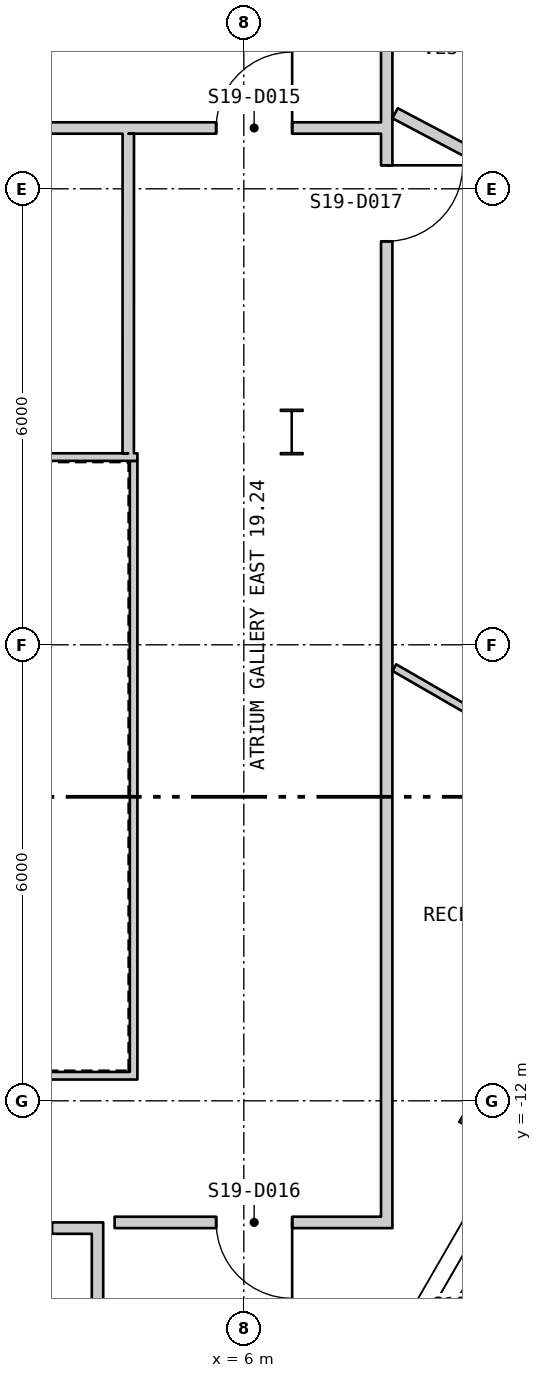
"""IFC4 building model, lengths in metres.
Left out: names, types, materials, properties, quantities, classifications, styles, units other than length and angle.
Written with IfcOpenShell. Run it as: python <this file> out.ifc"""

import sys

from ifc_helpers import new_model, si_unit, direction, frame, frame_2d, origin, origin_2d, place, context, subcontext, project, spatial, polyline, rectangle, hollow_rectangle, i_section, outline, extrude, element, fill, save


model = new_model("IFC4")
c1 = context("Model", 3, precision=1e-05, world=origin(), true_north=direction((0.0, 1.0)))
c2 = subcontext(c1, "Body", "Model", "MODEL_VIEW")
j1 = project(units=[si_unit("LENGTHUNIT", "METRE"), si_unit("PLANEANGLEUNIT", "RADIAN")], contexts=[c1])
p1 = place(None, origin())
s1 = spatial("IfcSite", under=j1, at=p1, CompositionType="ELEMENT")
p2 = place(p1, origin())
s2 = spatial("IfcBuilding", under=s1, at=p2, CompositionType="ELEMENT")
p3 = place(p2, frame((0.0, 0.0, 257.1)))
s3 = spatial("IfcBuildingStorey", under=s2, at=p3, CompositionType="ELEMENT", Elevation=257.1)
p4 = place(p3, frame((9.253, -12.238, 0.0), z_axis=(0.0, 0.0, 1.0), x_axis=(0.5, 0.866025403784, 0.0)))
e1 = element("IfcColumn", 1, at=p4, inside=s3, PredefinedType="COLUMN", context=c2, shape_type="SweptSolid", body=[
    extrude(hollow_rectangle(XDim=0.5, YDim=0.7, WallThickness=0.045, at=origin_2d()), origin(), (0.0, 0.0, 1.0), 3.9),
])
p5 = place(p3, frame((6.63, -3.2, 0.0), z_axis=(0.0, 0.0, 1.0), x_axis=(1.0, 0.0, 0.0)))
e2 = element("IfcColumn", 2, at=p5, inside=s3, PredefinedType="COLUMN", context=c2, shape_type="SweptSolid", body=[
    extrude(i_section(OverallWidth=0.3, OverallDepth=0.6, WebThickness=0.015, FlangeThickness=0.03, at=origin_2d()), origin(), (0.0, 0.0, 1.0), 3.9),
])
p6 = place(p3, frame((2.825, -24.522, -0.18), z_axis=(0.0, 0.0, 1.0), x_axis=(0.500000141277, 0.866025322218, 0.0)))
e3 = element("IfcWall", 3, at=p6, inside=s3, PredefinedType="SOLIDWALL", context=c2, shape_type="SweptSolid", body=[
    extrude(outline(polyline([(-0.13, -0.225), (45.86, -0.225), (45.6, 0.225), (0.13, 0.225), (-0.13, -0.225)])), origin(), (0.0, 0.0, 1.0), 3.68),
])
p7 = place(p6, frame((1.424, 0.0, 1.08)))
e4 = element("IfcOpeningElement", 4, at=p7, cuts=e3, PredefinedType="OPENING", context=c2, shape_type="SweptSolid", body=[
    extrude(rectangle(XDim=2.4, YDim=2.0, at=frame_2d((1.2, 1.0))), frame((0.0, 0.235, 0.0), z_axis=(0.0, -1.0, 0.0), x_axis=(1.0, 0.0, 0.0)), (0.0, 0.0, 1.0), 0.47),
])
p8 = place(p6, frame((5.892, 0.0, 1.08)))
e5 = element("IfcOpeningElement", 5, at=p8, cuts=e3, PredefinedType="OPENING", context=c2, shape_type="SweptSolid", body=[
    extrude(rectangle(XDim=2.4, YDim=2.0, at=frame_2d((1.2, 1.0))), frame((0.0, 0.235, 0.0), z_axis=(0.0, -1.0, 0.0), x_axis=(1.0, 0.0, 0.0)), (0.0, 0.0, 1.0), 0.47),
])
p9 = place(p6, frame((10.399, 0.0, 1.08)))
e6 = element("IfcOpeningElement", 6, at=p9, cuts=e3, PredefinedType="OPENING", context=c2, shape_type="SweptSolid", body=[
    extrude(rectangle(XDim=2.4, YDim=2.0, at=frame_2d((1.2, 1.0))), frame((0.0, 0.235, 0.0), z_axis=(0.0, -1.0, 0.0), x_axis=(1.0, 0.0, 0.0)), (0.0, 0.0, 1.0), 0.47),
])
p10 = place(p6, frame((14.905, 0.0, 1.08)))
e7 = element("IfcOpeningElement", 7, at=p10, cuts=e3, PredefinedType="OPENING", context=c2, shape_type="SweptSolid", body=[
    extrude(rectangle(XDim=2.4, YDim=2.0, at=frame_2d((1.2, 1.0))), frame((0.0, 0.235, 0.0), z_axis=(0.0, -1.0, 0.0), x_axis=(1.0, 0.0, 0.0)), (0.0, 0.0, 1.0), 0.47),
])
p11 = place(p6, frame((19.412, 0.0, 1.08)))
e8 = element("IfcOpeningElement", 8, at=p11, cuts=e3, PredefinedType="OPENING", context=c2, shape_type="SweptSolid", body=[
    extrude(rectangle(XDim=2.4, YDim=2.0, at=frame_2d((1.2, 1.0))), frame((0.0, 0.235, 0.0), z_axis=(0.0, -1.0, 0.0), x_axis=(1.0, 0.0, 0.0)), (0.0, 0.0, 1.0), 0.47),
])
p12 = place(p6, frame((28.425, 0.0, 1.08)))
e9 = element("IfcOpeningElement", 9, at=p12, cuts=e3, PredefinedType="OPENING", context=c2, shape_type="SweptSolid", body=[
    extrude(rectangle(XDim=2.4, YDim=2.0, at=frame_2d((1.2, 1.0))), frame((0.0, 0.235, 0.0), z_axis=(0.0, -1.0, 0.0), x_axis=(1.0, 0.0, 0.0)), (0.0, 0.0, 1.0), 0.47),
])
p13 = place(p6, frame((37.438, 0.0, 1.08)))
e10 = element("IfcOpeningElement", 10, at=p13, cuts=e3, PredefinedType="OPENING", context=c2, shape_type="SweptSolid", body=[
    extrude(rectangle(XDim=2.4, YDim=2.0, at=frame_2d((1.2, 1.0))), frame((0.0, 0.235, 0.0), z_axis=(0.0, -1.0, 0.0), x_axis=(1.0, 0.0, 0.0)), (0.0, 0.0, 1.0), 0.47),
])
p14 = place(p6, frame((41.907, 0.0, 1.08)))
e11 = element("IfcOpeningElement", 11, at=p14, cuts=e3, PredefinedType="OPENING", context=c2, shape_type="SweptSolid", body=[
    extrude(rectangle(XDim=2.4, YDim=2.0, at=frame_2d((1.2, 1.0))), frame((0.0, 0.235, 0.0), z_axis=(0.0, -1.0, 0.0), x_axis=(1.0, 0.0, 0.0)), (0.0, 0.0, 1.0), 0.47),
])
p15 = place(p3, frame((-4.6, -11.67, 0.0), z_axis=(0.0, 0.0, 1.0), x_axis=(1.0, 0.0, 0.0)))
e12 = element("IfcWall", 12, at=p15, inside=s3, PredefinedType="PARTITIONING", context=c2, shape_type="SweptSolid", body=[
    extrude(rectangle(XDim=9.2, YDim=0.1, at=frame_2d((4.6, 0.0))), origin(), (0.0, 0.0, 1.0), 3.7),
])
p16 = place(p3, frame((4.55, -11.62, 0.0), z_axis=(0.0, 0.0, 1.0), x_axis=(0.0, 1.0, 0.0)))
e13 = element("IfcWall", 13, at=p16, inside=s3, PredefinedType="PARTITIONING", context=c2, shape_type="SweptSolid", body=[
    extrude(rectangle(XDim=8.04, YDim=0.1, at=frame_2d((4.02, 0.0))), origin(), (0.0, 0.0, 1.0), 3.7),
])
p17 = place(p3, frame((4.6, -3.53, 0.0), z_axis=(0.0, 0.0, 1.0), x_axis=(-1.0, 0.0, 0.0)))
e14 = element("IfcWall", 14, at=p17, inside=s3, PredefinedType="PARTITIONING", context=c2, shape_type="SweptSolid", body=[
    extrude(rectangle(XDim=9.2, YDim=0.1, at=frame_2d((4.6, 0.0))), origin(), (0.0, 0.0, 1.0), 3.7),
])
p18 = place(p3, frame((4.075, -16.15, 0.0), z_axis=(0.0, 0.0, 1.0), x_axis=(0.0, 1.0, 0.0)))
e15 = element("IfcWall", 15, at=p18, inside=s3, PredefinedType="PARTITIONING", context=c2, shape_type="SweptSolid", body=[
    extrude(rectangle(XDim=2.4, YDim=0.15, at=frame_2d((1.2, 0.0))), origin(), (0.0, 0.0, 1.0), 3.7),
])
p19 = place(p3, frame((1.55, -13.675, 0.0), z_axis=(0.0, 0.0, 1.0), x_axis=(1.0, 0.0, 0.0)))
e16 = element("IfcWall", 16, at=p19, inside=s3, PredefinedType="PARTITIONING", context=c2, shape_type="SweptSolid", body=[
    extrude(rectangle(XDim=2.6, YDim=0.15, at=frame_2d((1.3, 0.0))), origin(), (0.0, 0.0, 1.0), 2.692),
])
p20 = place(p19, frame((0.675, 0.0, 0.0)))
e17 = element("IfcOpeningElement", 17, at=p20, cuts=e16, PredefinedType="OPENING", context=c2, shape_type="SweptSolid", body=[
    extrude(rectangle(XDim=1.25, YDim=2.1, at=frame_2d((0.625, 1.05))), frame((0.0, 0.085, 0.0), z_axis=(0.0, -1.0, 0.0), x_axis=(1.0, 0.0, 0.0)), (0.0, 0.0, 1.0), 0.17),
])
p21 = place(p3, frame((-7.805, 0.8, 0.0), z_axis=(0.0, 0.0, 1.0), x_axis=(1.0, 0.0, 0.0)))
e18 = element("IfcWall", 18, at=p21, inside=s3, PredefinedType="PARTITIONING", context=c2, shape_type="SweptSolid", body=[
    extrude(rectangle(XDim=15.61, YDim=0.15, at=frame_2d((7.805, 0.0))), origin(), (0.0, 0.0, 1.0), 3.7),
])
p22 = place(p21, frame((1.168, 0.0, 0.0)))
e19 = element("IfcOpeningElement", 19, at=p22, cuts=e18, PredefinedType="OPENING", context=c2, shape_type="SweptSolid", body=[
    extrude(rectangle(XDim=1.0, YDim=2.1, at=frame_2d((0.5, 1.05))), frame((0.0, 0.085, 0.0), z_axis=(0.0, -1.0, 0.0), x_axis=(1.0, 0.0, 0.0)), (0.0, 0.0, 1.0), 0.17),
])
p23 = place(p21, frame((6.399, 0.0, 0.0)))
e20 = element("IfcOpeningElement", 20, at=p23, cuts=e18, PredefinedType="OPENING", context=c2, shape_type="SweptSolid", body=[
    extrude(rectangle(XDim=1.0, YDim=2.1, at=frame_2d((0.5, 1.05))), frame((0.0, 0.085, 0.0), z_axis=(0.0, -1.0, 0.0), x_axis=(1.0, 0.0, 0.0)), (0.0, 0.0, 1.0), 0.17),
])
p24 = place(p21, frame((8.006, 0.0, 0.0)))
e21 = element("IfcOpeningElement", 21, at=p24, cuts=e18, PredefinedType="OPENING", context=c2, shape_type="SweptSolid", body=[
    extrude(rectangle(XDim=1.0, YDim=2.1, at=frame_2d((0.5, 1.05))), frame((0.0, 0.085, 0.0), z_axis=(0.0, -1.0, 0.0), x_axis=(1.0, 0.0, 0.0)), (0.0, 0.0, 1.0), 0.17),
])
p25 = place(p21, frame((13.441, 0.0, 0.0)))
e22 = element("IfcOpeningElement", 22, at=p25, cuts=e18, PredefinedType="OPENING", context=c2, shape_type="SweptSolid", body=[
    extrude(rectangle(XDim=1.0, YDim=2.1, at=frame_2d((0.5, 1.05))), frame((0.0, 0.085, 0.0), z_axis=(0.0, -1.0, 0.0), x_axis=(1.0, 0.0, 0.0)), (0.0, 0.0, 1.0), 0.17),
])
p26 = place(p3, frame((4.3, -13.6, 0.0), z_axis=(0.0, 0.0, 1.0), x_axis=(1.0, 0.0, 0.0)))
e23 = element("IfcWall", 23, at=p26, inside=s3, PredefinedType="PARTITIONING", context=c2, shape_type="SweptSolid", body=[
    extrude(rectangle(XDim=3.505, YDim=0.15, at=frame_2d((1.752, 0.0))), origin(), (0.0, 0.0, 1.0), 2.692),
])
p27 = place(p26, frame((1.336, 0.0, 0.0)))
e24 = element("IfcOpeningElement", 24, at=p27, cuts=e23, PredefinedType="OPENING", context=c2, shape_type="SweptSolid", body=[
    extrude(rectangle(XDim=1.0, YDim=2.1, at=frame_2d((0.5, 1.05))), frame((0.0, 0.085, 0.0), z_axis=(0.0, -1.0, 0.0), x_axis=(1.0, 0.0, 0.0)), (0.0, 0.0, 1.0), 0.17),
])
p28 = place(p3, frame((4.479, -3.48, 0.0), z_axis=(0.0, 0.0, 1.0), x_axis=(0.000237812122, 0.999999971723, 0.0)))
e25 = element("IfcWall", 25, at=p28, inside=s3, PredefinedType="PARTITIONING", context=c2, shape_type="SweptSolid", body=[
    extrude(rectangle(XDim=4.205, YDim=0.15, at=frame_2d((2.103, 0.0))), origin(), (0.0, 0.0, 1.0), 3.7),
])
p29 = place(p3, frame((7.88, -13.675, 0.0), z_axis=(0.0, 0.0, 1.0), x_axis=(0.0, 1.0, 0.0)))
e26 = element("IfcWall", 26, at=p29, inside=s3, PredefinedType="PARTITIONING", context=c2, shape_type="SweptSolid", body=[
    extrude(rectangle(XDim=17.675, YDim=0.15, at=frame_2d((8.838, 0.0))), origin(), (0.0, 0.0, 1.0), 3.7),
])
p30 = place(p29, frame((12.984, 0.0, 0.0)))
e27 = element("IfcOpeningElement", 27, at=p30, cuts=e26, PredefinedType="OPENING", context=c2, shape_type="SweptSolid", body=[
    extrude(rectangle(XDim=1.0, YDim=2.1, at=frame_2d((0.5, 1.05))), frame((0.0, 0.085, 0.0), z_axis=(0.0, -1.0, 0.0), x_axis=(1.0, 0.0, 0.0)), (0.0, 0.0, 1.0), 0.17),
])
p31 = place(p29, frame((16.275, 0.0, 0.0)))
e28 = element("IfcOpeningElement", 28, at=p31, cuts=e26, PredefinedType="OPENING", context=c2, shape_type="SweptSolid", body=[
    extrude(rectangle(XDim=1.0, YDim=2.1, at=frame_2d((0.5, 1.05))), frame((0.0, 0.085, 0.0), z_axis=(0.0, -1.0, 0.0), x_axis=(1.0, 0.0, 0.0)), (0.0, 0.0, 1.0), 0.17),
])
p32 = place(p3, frame((7.98, -6.3, 0.0), z_axis=(0.0, 0.0, 1.0), x_axis=(0.866143665252, -0.499795109164, 0.0)))
e29 = element("IfcWall", 29, at=p32, inside=s3, PredefinedType="PARTITIONING", context=c2, shape_type="SweptSolid", body=[
    extrude(rectangle(XDim=3.972, YDim=0.1, at=frame_2d((1.986, 0.0))), origin(), (0.0, 0.0, 1.0), 3.7),
])
p33 = place(p3, frame((7.99, 0.994, 0.0), z_axis=(0.0, 0.0, 1.0), x_axis=(0.88420981039, -0.467089939102, 0.0)))
e30 = element("IfcWall", 30, at=p33, inside=s3, PredefinedType="PARTITIONING", context=c2, shape_type="SweptSolid", body=[
    extrude(rectangle(XDim=8.065, YDim=0.15, at=frame_2d((4.032, 0.0))), origin(), (0.0, 0.0, 1.0), 3.7),
])
p34 = place(p9, origin())
e31 = element("IfcWindow", 31, at=p34, inside=s3, PartitioningType="SINGLE_PANEL", PredefinedType="WINDOW", context=c2, shape_type="SweptSolid", body=[
    extrude(rectangle(XDim=2.4, YDim=2.0, at=frame_2d((1.2, 1.0))), frame((0.0, 0.105, 0.0), z_axis=(0.0, -1.0, 0.0), x_axis=(1.0, 0.0, 0.0)), (0.0, 0.0, 1.0), 0.06),
])
fill(e6, e31)
p35 = place(p25, origin())
e32 = element("IfcDoor", 32, at=p35, inside=s3, OperationType="SINGLE_SWING_LEFT", PredefinedType="DOOR", context=c2, shape_type="SweptSolid", body=[
    extrude(rectangle(XDim=1.0, YDim=2.1, at=frame_2d((0.5, 1.05))), frame((0.0, 0.025, 0.0), z_axis=(0.0, -1.0, 0.0), x_axis=(1.0, 0.0, 0.0)), (0.0, 0.0, 1.0), 0.05),
])
fill(e22, e32)
p36 = place(p27, origin())
e33 = element("IfcDoor", 33, at=p36, inside=s3, OperationType="SINGLE_SWING_RIGHT", PredefinedType="DOOR", context=c2, shape_type="SweptSolid", body=[
    extrude(rectangle(XDim=1.0, YDim=2.1, at=frame_2d((0.5, 1.05))), frame((0.0, 0.025, 0.0), z_axis=(0.0, -1.0, 0.0), x_axis=(1.0, 0.0, 0.0)), (0.0, 0.0, 1.0), 0.05),
])
fill(e24, e33)
p37 = place(p30, origin())
e34 = element("IfcDoor", 34, at=p37, inside=s3, OperationType="SINGLE_SWING_RIGHT", PredefinedType="DOOR", context=c2, shape_type="SweptSolid", body=[
    extrude(rectangle(XDim=1.0, YDim=2.1, at=frame_2d((0.5, 1.05))), frame((0.0, 0.025, 0.0), z_axis=(0.0, -1.0, 0.0), x_axis=(1.0, 0.0, 0.0)), (0.0, 0.0, 1.0), 0.05),
])
fill(e27, e34)
save(model, sys.argv[1])
